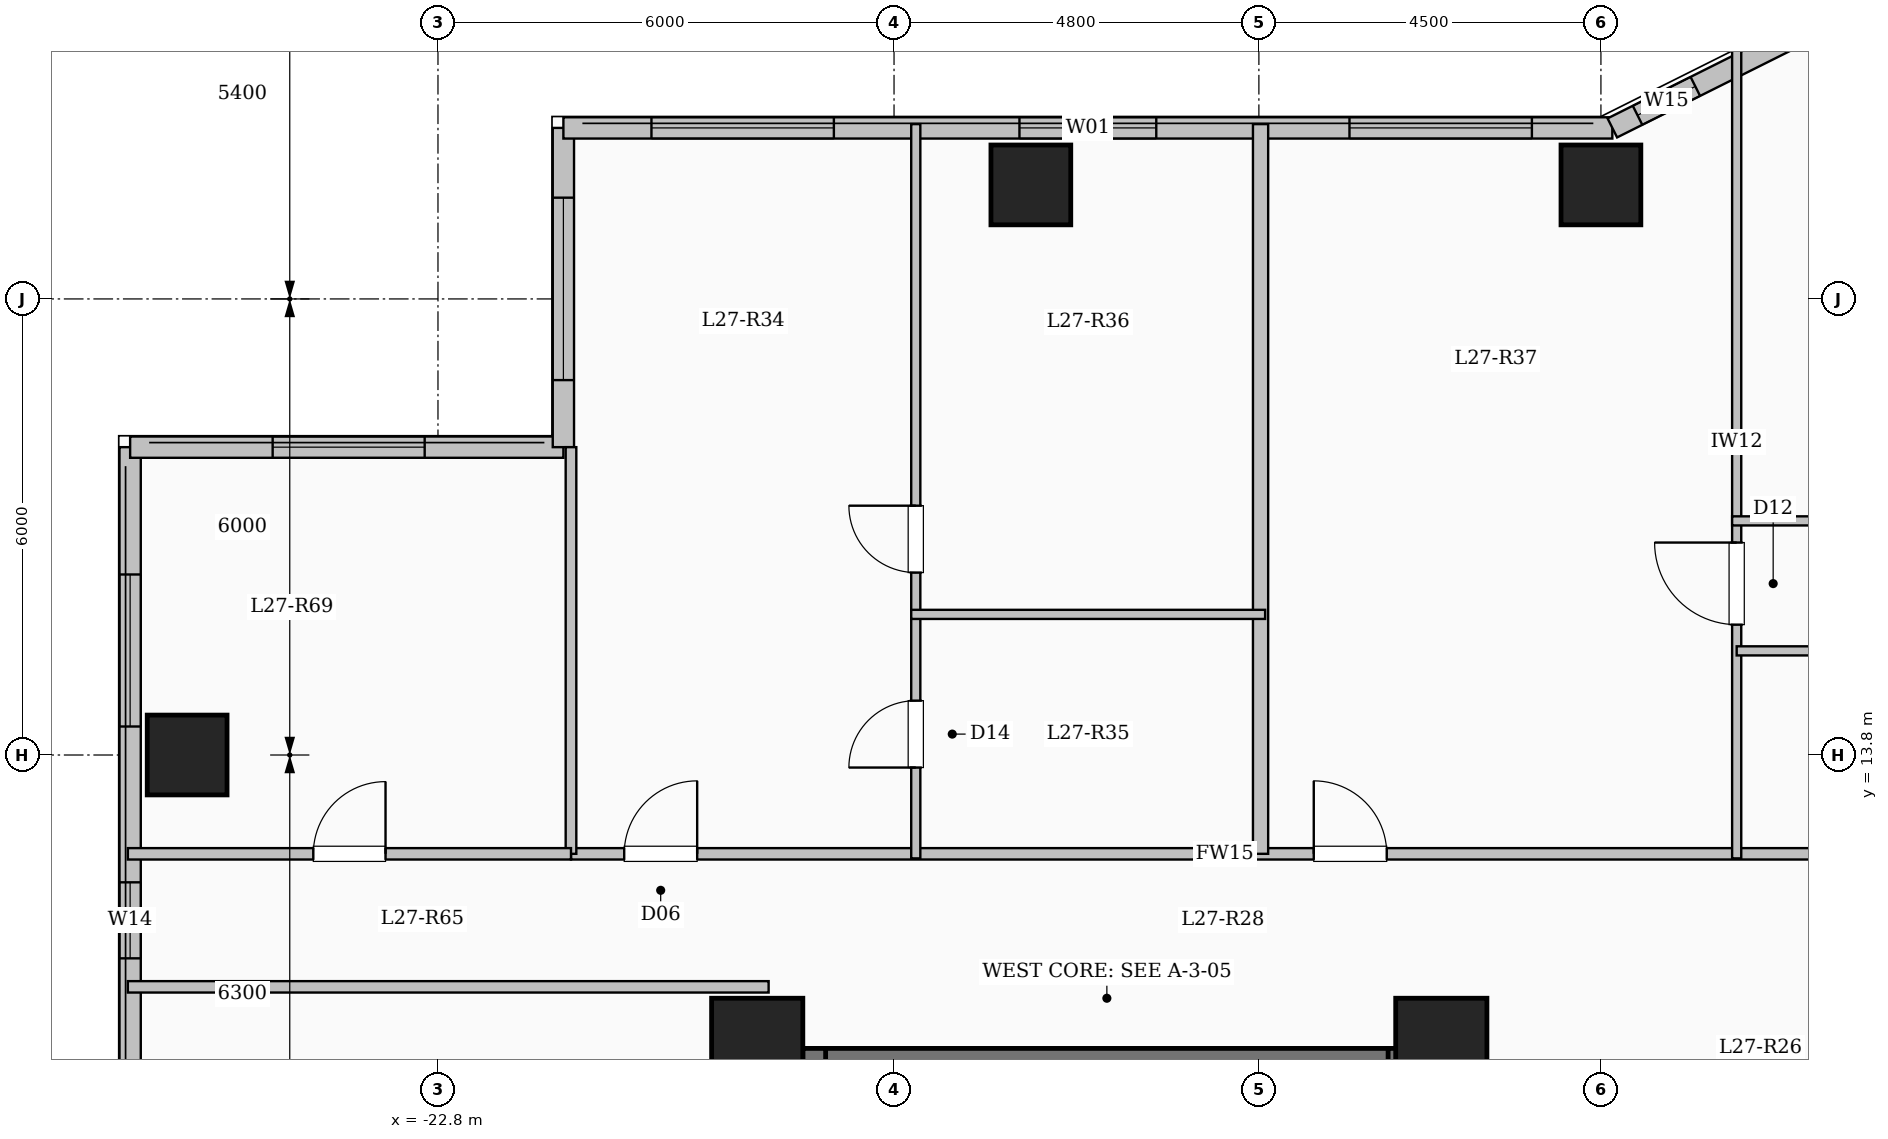
"""IFC4 building model, lengths in metres.
Left out: names, types, materials, properties, quantities, classifications, styles, units other than length and angle.
Written with IfcOpenShell. Run it as: python <this file> out.ifc"""

import sys

from ifc_helpers import new_model, si_unit, direction, frame, frame_2d, origin, origin_2d, place, context, subcontext, project, spatial, rectangle, extrude, element, fill, save


model = new_model("IFC4")
c1 = context("Model", 3, precision=1e-05, world=origin(), true_north=direction((0.0, 1.0)))
c2 = subcontext(c1, "Body", "Model", "MODEL_VIEW")
j1 = project(units=[si_unit("LENGTHUNIT", "METRE"), si_unit("PLANEANGLEUNIT", "RADIAN")], contexts=[c1])
p1 = place(None, origin())
s1 = spatial("IfcSite", under=j1, at=p1, CompositionType="ELEMENT")
p2 = place(p1, origin())
s2 = spatial("IfcBuilding", under=s1, at=p2, CompositionType="ELEMENT")
p3 = place(p2, frame((0.0, 0.0, 101.75)))
s3 = spatial("IfcBuildingStorey", under=s2, at=p3, CompositionType="ELEMENT", Elevation=101.75)
for number, where, z_axis, x_axis in (
    (1, (-9.6, 10.0, 0.0), (0.0, 0.0, 1.0), (1.0, 0.0, 0.0)),
    (2, (-18.6, 10.0, 0.0), (0.0, 0.0, 1.0), (1.0, 0.0, 0.0)),
):
    element("IfcColumn", number, at=place(p3, frame(where, z_axis=z_axis, x_axis=x_axis)), inside=s3, PredefinedType="COLUMN", context=c2, shape_type="SweptSolid", body=[
        extrude(rectangle(XDim=1.2, YDim=1.2, at=origin_2d()), origin(), (0.0, 0.0, 1.0), 3.35),
    ])
for number, where, z_axis, x_axis in (
    (3, (-15.0, 21.3, 0.0), (0.0, 0.0, 1.0), (1.0, 0.0, 0.0)),
    (4, (-7.5, 21.3, 0.0), (0.0, 0.0, 1.0), (1.0, 0.0, 0.0)),
    (5, (-26.1, 13.8, 0.0), (0.0, 0.0, 1.0), (1.0, 0.0, 0.0)),
):
    element("IfcColumn", number, at=place(p3, frame(where, z_axis=z_axis, x_axis=x_axis)), inside=s3, PredefinedType="COLUMN", context=c2, shape_type="SweptSolid", body=[
        extrude(rectangle(XDim=1.05, YDim=1.05, at=origin_2d()), origin(), (0.0, 0.0, 1.0), 3.35),
    ])
p4 = place(p3, frame((-26.85, -17.85, 0.0), z_axis=(0.0, 0.0, 1.0), x_axis=(0.0, 1.0, 0.0)))
e6 = element("IfcWall", 6, at=p4, inside=s3, PredefinedType="SOLIDWALL", context=c2, shape_type="SweptSolid", body=[
    extrude(rectangle(XDim=35.7, YDim=0.28, at=frame_2d((17.85, 0.0))), origin(), (0.0, 0.0, 1.0), 3.1),
])
p5 = place(p4, frame((2.55, 0.0, 0.9)))
e7 = element("IfcOpeningElement", 7, at=p5, cuts=e6, PredefinedType="OPENING", context=c2, shape_type="SweptSolid", body=[
    extrude(rectangle(XDim=2.4, YDim=1.8, at=frame_2d((1.2, 0.9))), frame((0.0, 0.15, 0.0), z_axis=(0.0, -1.0, 0.0), x_axis=(1.0, 0.0, 0.0)), (0.0, 0.0, 1.0), 0.3),
])
p6 = place(p4, frame((8.343, 0.0, 0.9)))
e8 = element("IfcOpeningElement", 8, at=p6, cuts=e6, PredefinedType="OPENING", context=c2, shape_type="SweptSolid", body=[
    extrude(rectangle(XDim=1.5, YDim=1.65, at=frame_2d((0.75, 0.825))), frame((0.0, 0.15, 0.0), z_axis=(0.0, -1.0, 0.0), x_axis=(1.0, 0.0, 0.0)), (0.0, 0.0, 1.0), 0.3),
])
p7 = place(p4, frame((18.6, 0.0, 0.9)))
e9 = element("IfcOpeningElement", 9, at=p7, cuts=e6, PredefinedType="OPENING", context=c2, shape_type="SweptSolid", body=[
    extrude(rectangle(XDim=2.0, YDim=1.7, at=frame_2d((1.0, 0.85))), frame((0.0, 0.15, 0.0), z_axis=(0.0, -1.0, 0.0), x_axis=(1.0, 0.0, 0.0)), (0.0, 0.0, 1.0), 0.3),
])
p8 = place(p4, frame((28.975, 0.0, 0.95)))
e10 = element("IfcOpeningElement", 10, at=p8, cuts=e6, PredefinedType="OPENING", context=c2, shape_type="SweptSolid", body=[
    extrude(rectangle(XDim=1.0, YDim=1.5, at=frame_2d((0.5, 0.75))), frame((0.0, 0.15, 0.0), z_axis=(0.0, -1.0, 0.0), x_axis=(1.0, 0.0, 0.0)), (0.0, 0.0, 1.0), 0.3),
])
p9 = place(p4, frame((32.025, 0.0, 0.9)))
e11 = element("IfcOpeningElement", 11, at=p9, cuts=e6, PredefinedType="OPENING", context=c2, shape_type="SweptSolid", body=[
    extrude(rectangle(XDim=2.0, YDim=1.7, at=frame_2d((1.0, 0.85))), frame((0.0, 0.15, 0.0), z_axis=(0.0, -1.0, 0.0), x_axis=(1.0, 0.0, 0.0)), (0.0, 0.0, 1.0), 0.3),
])
p10 = place(p3, frame((-26.85, 17.85, 0.0), z_axis=(0.0, 0.0, 1.0), x_axis=(1.0, 0.0, 0.0)))
e12 = element("IfcWall", 12, at=p10, inside=s3, PredefinedType="SOLIDWALL", context=c2, shape_type="SweptSolid", body=[
    extrude(rectangle(XDim=5.7, YDim=0.28, at=frame_2d((2.85, 0.0))), origin(), (0.0, 0.0, 1.0), 3.1),
])
p11 = place(p10, frame((1.875, 0.0, 0.9)))
e13 = element("IfcOpeningElement", 13, at=p11, cuts=e12, PredefinedType="OPENING", context=c2, shape_type="SweptSolid", body=[
    extrude(rectangle(XDim=2.0, YDim=1.7, at=frame_2d((1.0, 0.85))), frame((0.0, 0.15, 0.0), z_axis=(0.0, -1.0, 0.0), x_axis=(1.0, 0.0, 0.0)), (0.0, 0.0, 1.0), 0.3),
])
p12 = place(p3, frame((-21.15, 17.85, 0.0), z_axis=(0.0, 0.0, 1.0), x_axis=(0.0, 1.0, 0.0)))
e14 = element("IfcWall", 14, at=p12, inside=s3, PredefinedType="SOLIDWALL", context=c2, shape_type="SweptSolid", body=[
    extrude(rectangle(XDim=4.2, YDim=0.28, at=frame_2d((2.1, 0.0))), origin(), (0.0, 0.0, 1.0), 3.1),
])
p13 = place(p12, frame((0.882, 0.0, 0.9)))
e15 = element("IfcOpeningElement", 15, at=p13, cuts=e14, PredefinedType="OPENING", context=c2, shape_type="SweptSolid", body=[
    extrude(rectangle(XDim=2.4, YDim=1.8, at=frame_2d((1.2, 0.9))), frame((0.0, 0.15, 0.0), z_axis=(0.0, -1.0, 0.0), x_axis=(1.0, 0.0, 0.0)), (0.0, 0.0, 1.0), 0.3),
])
p14 = place(p3, frame((-21.15, 22.05, 0.0), z_axis=(0.0, 0.0, 1.0), x_axis=(1.0, 0.0, 0.0)))
e16 = element("IfcWall", 16, at=p14, inside=s3, PredefinedType="SOLIDWALL", context=c2, shape_type="SweptSolid", body=[
    extrude(rectangle(XDim=13.8, YDim=0.28, at=frame_2d((6.9, 0.0))), origin(), (0.0, 0.0, 1.0), 3.1),
])
p15 = place(p14, frame((1.158, 0.0, 0.9)))
e17 = element("IfcOpeningElement", 17, at=p15, cuts=e16, PredefinedType="OPENING", context=c2, shape_type="SweptSolid", body=[
    extrude(rectangle(XDim=2.4, YDim=1.8, at=frame_2d((1.2, 0.9))), frame((0.0, 0.15, 0.0), z_axis=(0.0, -1.0, 0.0), x_axis=(1.0, 0.0, 0.0)), (0.0, 0.0, 1.0), 0.3),
])
p16 = place(p14, frame((6.0, 0.0, 0.9)))
e18 = element("IfcOpeningElement", 18, at=p16, cuts=e16, PredefinedType="OPENING", context=c2, shape_type="SweptSolid", body=[
    extrude(rectangle(XDim=1.8, YDim=1.65, at=frame_2d((0.9, 0.825))), frame((0.0, 0.15, 0.0), z_axis=(0.0, -1.0, 0.0), x_axis=(1.0, 0.0, 0.0)), (0.0, 0.0, 1.0), 0.3),
])
p17 = place(p14, frame((10.342, 0.0, 0.9)))
e19 = element("IfcOpeningElement", 19, at=p17, cuts=e16, PredefinedType="OPENING", context=c2, shape_type="SweptSolid", body=[
    extrude(rectangle(XDim=2.4, YDim=1.8, at=frame_2d((1.2, 0.9))), frame((0.0, 0.15, 0.0), z_axis=(0.0, -1.0, 0.0), x_axis=(1.0, 0.0, 0.0)), (0.0, 0.0, 1.0), 0.3),
])
p18 = place(p3, frame((-7.35, 22.05, 0.0), z_axis=(0.0, 0.0, 1.0), x_axis=(0.894427191, 0.4472135955, 0.0)))
e20 = element("IfcWall", 20, at=p18, inside=s3, PredefinedType="SOLIDWALL", context=c2, shape_type="SweptSolid", body=[
    extrude(rectangle(XDim=3.354, YDim=0.28, at=frame_2d((1.677, 0.0))), origin(), (0.0, 0.0, 1.0), 3.1),
])
p19 = place(p18, frame((0.371, 0.0, 0.95)))
e21 = element("IfcOpeningElement", 21, at=p19, cuts=e20, PredefinedType="OPENING", context=c2, shape_type="SweptSolid", body=[
    extrude(rectangle(XDim=0.85, YDim=1.5, at=frame_2d((0.425, 0.75))), frame((0.0, 0.15, 0.0), z_axis=(0.0, -1.0, 0.0), x_axis=(1.0, 0.0, 0.0)), (0.0, 0.0, 1.0), 0.3),
])
p20 = place(p3, frame((-18.0, 9.79, 0.0), z_axis=(0.0, 0.0, 1.0), x_axis=(1.0, 0.0, 0.0)))
e22 = element("IfcWall", 22, at=p20, inside=s3, PredefinedType="SHEAR", context=c2, shape_type="SweptSolid", body=[
    extrude(rectangle(XDim=8.0, YDim=0.3, at=frame_2d((4.0, 0.0))), origin(), (0.0, 0.0, 1.0), 3.35),
])
for number, where, z_axis, x_axis in (
    (23, (-17.85, 6.35, 0.0), (0.0, 0.0, 1.0), (0.0, 1.0, 0.0)),
    (24, (-10.15, 6.35, 0.0), (0.0, 0.0, 1.0), (0.0, 1.0, 0.0)),
):
    element("IfcWall", number, at=place(p3, frame(where, z_axis=z_axis, x_axis=x_axis)), inside=s3, PredefinedType="SHEAR", context=c2, shape_type="SweptSolid", body=[
        extrude(rectangle(XDim=3.59, YDim=0.3, at=frame_2d((1.795, 0.0))), origin(), (0.0, 0.0, 1.0), 3.35),
    ])
p21 = place(p3, frame((-21.05, 12.5, 0.0), z_axis=(0.0, 0.0, 1.0), x_axis=(1.0, 0.0, 0.0)))
e25 = element("IfcWall", 25, at=p21, inside=s3, PredefinedType="PARTITIONING", context=c2, shape_type="SweptSolid", body=[
    extrude(rectangle(XDim=17.2, YDim=0.15, at=frame_2d((8.6, 0.0))), origin(), (0.0, 0.0, 1.0), 3.1),
])
p22 = place(p21, frame((0.7, 0.0, 0.0)))
e26 = element("IfcOpeningElement", 26, at=p22, cuts=e25, PredefinedType="OPENING", context=c2, shape_type="SweptSolid", body=[
    extrude(rectangle(XDim=0.96, YDim=2.15, at=frame_2d((0.48, 1.075))), frame((0.0, 0.085, 0.0), z_axis=(0.0, -1.0, 0.0), x_axis=(1.0, 0.0, 0.0)), (0.0, 0.0, 1.0), 0.17),
])
p23 = place(p21, frame((9.772, 0.0, 0.0)))
e27 = element("IfcOpeningElement", 27, at=p23, cuts=e25, PredefinedType="OPENING", context=c2, shape_type="SweptSolid", body=[
    extrude(rectangle(XDim=0.96, YDim=2.15, at=frame_2d((0.48, 1.075))), frame((0.0, 0.085, 0.0), z_axis=(0.0, -1.0, 0.0), x_axis=(1.0, 0.0, 0.0)), (0.0, 0.0, 1.0), 0.17),
])
p24 = place(p3, frame((-11.978, 12.5, 0.0), z_axis=(0.0, 0.0, 1.0), x_axis=(0.0, 1.0, 0.0)))
e28 = element("IfcWall", 28, at=p24, inside=s3, PredefinedType="SOLIDWALL", context=c2, shape_type="SweptSolid", body=[
    extrude(rectangle(XDim=9.6, YDim=0.2, at=frame_2d((4.8, 0.0))), origin(), (0.0, 0.0, 1.0), 3.1),
])
p25 = place(p3, frame((-16.514, 12.44, 0.0), z_axis=(0.0, 0.0, 1.0), x_axis=(0.0, 1.0, 0.0)))
e29 = element("IfcWall", 29, at=p25, inside=s3, PredefinedType="PARTITIONING", context=c2, shape_type="SweptSolid", body=[
    extrude(rectangle(XDim=3.21, YDim=0.12, at=frame_2d((1.605, 0.0))), origin(), (0.0, 0.0, 1.0), 3.1),
])
p26 = place(p25, frame((1.195, 0.0, 0.0)))
e30 = element("IfcOpeningElement", 30, at=p26, cuts=e29, PredefinedType="OPENING", context=c2, shape_type="SweptSolid", body=[
    extrude(rectangle(XDim=0.88, YDim=2.1, at=frame_2d((0.44, 1.05))), frame((0.0, 0.07, 0.0), z_axis=(0.0, -1.0, 0.0), x_axis=(1.0, 0.0, 0.0)), (0.0, 0.0, 1.0), 0.14),
])
p27 = place(p3, frame((-16.514, 15.65, 0.0), z_axis=(0.0, 0.0, 1.0), x_axis=(0.0, 1.0, 0.0)))
e31 = element("IfcWall", 31, at=p27, inside=s3, PredefinedType="PARTITIONING", context=c2, shape_type="SweptSolid", body=[
    extrude(rectangle(XDim=6.45, YDim=0.12, at=frame_2d((3.225, 0.0))), origin(), (0.0, 0.0, 1.0), 3.1),
])
p28 = place(p27, frame((0.55, 0.0, 0.0)))
e32 = element("IfcOpeningElement", 32, at=p28, cuts=e31, PredefinedType="OPENING", context=c2, shape_type="SweptSolid", body=[
    extrude(rectangle(XDim=0.88, YDim=2.1, at=frame_2d((0.44, 1.05))), frame((0.0, 0.07, 0.0), z_axis=(0.0, -1.0, 0.0), x_axis=(1.0, 0.0, 0.0)), (0.0, 0.0, 1.0), 0.14),
])
p29 = place(p3, frame((-16.574, 15.65, 0.0), z_axis=(0.0, 0.0, 1.0), x_axis=(1.0, 0.0, 0.0)))
e33 = element("IfcWall", 33, at=p29, inside=s3, PredefinedType="PARTITIONING", context=c2, shape_type="SweptSolid", body=[
    extrude(rectangle(XDim=4.656, YDim=0.12, at=frame_2d((2.328, 0.0))), origin(), (0.0, 0.0, 1.0), 3.1),
])
p30 = place(p3, frame((-5.714, 12.44, 0.0), z_axis=(0.0, 0.0, 1.0), x_axis=(0.0, 1.0, 0.0)))
e34 = element("IfcWall", 34, at=p30, inside=s3, PredefinedType="PARTITIONING", context=c2, shape_type="SweptSolid", body=[
    extrude(rectangle(XDim=10.964, YDim=0.12, at=frame_2d((5.482, 0.0))), origin(), (0.0, 0.0, 1.0), 3.1),
])
p31 = place(p30, frame((3.075, 0.0, 0.0)))
e35 = element("IfcOpeningElement", 35, at=p31, cuts=e34, PredefinedType="OPENING", context=c2, shape_type="SweptSolid", body=[
    extrude(rectangle(XDim=1.08, YDim=2.15, at=frame_2d((0.54, 1.075))), frame((0.0, 0.07, 0.0), z_axis=(0.0, -1.0, 0.0), x_axis=(1.0, 0.0, 0.0)), (0.0, 0.0, 1.0), 0.14),
])
p32 = place(p3, frame((-5.714, 15.17, 0.0), z_axis=(0.0, 0.0, 1.0), x_axis=(1.0, 0.0, 0.0)))
e36 = element("IfcWall", 36, at=p32, inside=s3, PredefinedType="PARTITIONING", context=c2, shape_type="SweptSolid", body=[
    extrude(rectangle(XDim=3.536, YDim=0.12, at=frame_2d((1.768, 0.0))), origin(), (0.0, 0.0, 1.0), 3.1),
])
p33 = place(p32, frame((1.328, 0.0, 0.0)))
e37 = element("IfcOpeningElement", 37, at=p33, cuts=e36, PredefinedType="OPENING", context=c2, shape_type="SweptSolid", body=[
    extrude(rectangle(XDim=0.88, YDim=2.1, at=frame_2d((0.44, 1.05))), frame((0.0, 0.07, 0.0), z_axis=(0.0, -1.0, 0.0), x_axis=(1.0, 0.0, 0.0)), (0.0, 0.0, 1.0), 0.14),
])
p34 = place(p3, frame((-5.774, 16.88, 0.0), z_axis=(0.0, 0.0, 1.0), x_axis=(1.0, 0.0, 0.0)))
e38 = element("IfcWall", 38, at=p34, inside=s3, PredefinedType="PARTITIONING", context=c2, shape_type="SweptSolid", body=[
    extrude(rectangle(XDim=6.384, YDim=0.12, at=frame_2d((3.192, 0.0))), origin(), (0.0, 0.0, 1.0), 3.1),
])
p35 = place(p34, frame((2.662, 0.0, 0.0)))
e39 = element("IfcOpeningElement", 39, at=p35, cuts=e38, PredefinedType="OPENING", context=c2, shape_type="SweptSolid", body=[
    extrude(rectangle(XDim=0.88, YDim=2.1, at=frame_2d((0.44, 1.05))), frame((0.0, 0.07, 0.0), z_axis=(0.0, -1.0, 0.0), x_axis=(1.0, 0.0, 0.0)), (0.0, 0.0, 1.0), 0.14),
])
p36 = place(p3, frame((-26.88, 10.75, 0.0), z_axis=(0.0, 0.0, 1.0), x_axis=(1.0, 0.0, 0.0)))
e40 = element("IfcWall", 40, at=p36, inside=s3, PredefinedType="PARTITIONING", context=c2, shape_type="SweptSolid", body=[
    extrude(rectangle(XDim=8.43, YDim=0.15, at=frame_2d((4.215, 0.0))), origin(), (0.0, 0.0, 1.0), 3.1),
])
p37 = place(p3, frame((-21.05, 12.5, 0.0), z_axis=(0.0, 0.0, 1.0), x_axis=(0.0, 1.0, 0.0)))
e41 = element("IfcWall", 41, at=p37, inside=s3, PredefinedType="PARTITIONING", context=c2, shape_type="SweptSolid", body=[
    extrude(rectangle(XDim=5.35, YDim=0.14, at=frame_2d((2.675, 0.0))), origin(), (0.0, 0.0, 1.0), 3.1),
])
p38 = place(p3, frame((-26.88, 12.5, 0.0), z_axis=(0.0, 0.0, 1.0), x_axis=(1.0, 0.0, 0.0)))
e42 = element("IfcWall", 42, at=p38, inside=s3, PredefinedType="PARTITIONING", context=c2, shape_type="SweptSolid", body=[
    extrude(rectangle(XDim=5.83, YDim=0.15, at=frame_2d((2.915, 0.0))), origin(), (0.0, 0.0, 1.0), 3.1),
])
p39 = place(p38, frame((2.44, 0.0, 0.0)))
e43 = element("IfcOpeningElement", 43, at=p39, cuts=e42, PredefinedType="OPENING", context=c2, shape_type="SweptSolid", body=[
    extrude(rectangle(XDim=0.95, YDim=2.15, at=frame_2d((0.475, 1.075))), frame((0.0, 0.085, 0.0), z_axis=(0.0, -1.0, 0.0), x_axis=(1.0, 0.0, 0.0)), (0.0, 0.0, 1.0), 0.17),
])
p40 = place(p8, origin())
e44 = element("IfcWindow", 44, at=p40, inside=s3, PartitioningType="SINGLE_PANEL", PredefinedType="WINDOW", context=c2, shape_type="SweptSolid", body=[
    extrude(rectangle(XDim=1.0, YDim=1.5, at=frame_2d((0.5, 0.75))), frame((0.0, 0.03, 0.0), z_axis=(0.0, -1.0, 0.0), x_axis=(1.0, 0.0, 0.0)), (0.0, 0.0, 1.0), 0.06),
])
fill(e10, e44)
p41 = place(p9, origin())
e45 = element("IfcWindow", 45, at=p41, inside=s3, PartitioningType="SINGLE_PANEL", PredefinedType="WINDOW", context=c2, shape_type="SweptSolid", body=[
    extrude(rectangle(XDim=2.0, YDim=1.7, at=frame_2d((1.0, 0.85))), frame((0.0, 0.03, 0.0), z_axis=(0.0, -1.0, 0.0), x_axis=(1.0, 0.0, 0.0)), (0.0, 0.0, 1.0), 0.06),
])
fill(e11, e45)
p42 = place(p11, origin())
e46 = element("IfcWindow", 46, at=p42, inside=s3, PartitioningType="SINGLE_PANEL", PredefinedType="WINDOW", context=c2, shape_type="SweptSolid", body=[
    extrude(rectangle(XDim=2.0, YDim=1.7, at=frame_2d((1.0, 0.85))), frame((0.0, 0.03, 0.0), z_axis=(0.0, -1.0, 0.0), x_axis=(1.0, 0.0, 0.0)), (0.0, 0.0, 1.0), 0.06),
])
fill(e13, e46)
p43 = place(p13, origin())
e47 = element("IfcWindow", 47, at=p43, inside=s3, PartitioningType="SINGLE_PANEL", PredefinedType="WINDOW", context=c2, shape_type="SweptSolid", body=[
    extrude(rectangle(XDim=2.4, YDim=1.8, at=frame_2d((1.2, 0.9))), frame((0.0, 0.03, 0.0), z_axis=(0.0, -1.0, 0.0), x_axis=(1.0, 0.0, 0.0)), (0.0, 0.0, 1.0), 0.06),
])
fill(e15, e47)
p44 = place(p15, origin())
e48 = element("IfcWindow", 48, at=p44, inside=s3, PartitioningType="SINGLE_PANEL", PredefinedType="WINDOW", context=c2, shape_type="SweptSolid", body=[
    extrude(rectangle(XDim=2.4, YDim=1.8, at=frame_2d((1.2, 0.9))), frame((0.0, 0.03, 0.0), z_axis=(0.0, -1.0, 0.0), x_axis=(1.0, 0.0, 0.0)), (0.0, 0.0, 1.0), 0.06),
])
fill(e17, e48)
p45 = place(p16, origin())
e49 = element("IfcWindow", 49, at=p45, inside=s3, PartitioningType="SINGLE_PANEL", PredefinedType="WINDOW", context=c2, shape_type="SweptSolid", body=[
    extrude(rectangle(XDim=1.8, YDim=1.65, at=frame_2d((0.9, 0.825))), frame((0.0, 0.03, 0.0), z_axis=(0.0, -1.0, 0.0), x_axis=(1.0, 0.0, 0.0)), (0.0, 0.0, 1.0), 0.06),
])
fill(e18, e49)
p46 = place(p17, origin())
e50 = element("IfcWindow", 50, at=p46, inside=s3, PartitioningType="SINGLE_PANEL", PredefinedType="WINDOW", context=c2, shape_type="SweptSolid", body=[
    extrude(rectangle(XDim=2.4, YDim=1.8, at=frame_2d((1.2, 0.9))), frame((0.0, 0.03, 0.0), z_axis=(0.0, -1.0, 0.0), x_axis=(1.0, 0.0, 0.0)), (0.0, 0.0, 1.0), 0.06),
])
fill(e19, e50)
p47 = place(p19, origin())
e51 = element("IfcWindow", 51, at=p47, inside=s3, PartitioningType="SINGLE_PANEL", PredefinedType="WINDOW", context=c2, shape_type="SweptSolid", body=[
    extrude(rectangle(XDim=0.85, YDim=1.5, at=frame_2d((0.425, 0.75))), frame((0.0, 0.03, 0.0), z_axis=(0.0, -1.0, 0.0), x_axis=(1.0, 0.0, 0.0)), (0.0, 0.0, 1.0), 0.06),
])
fill(e21, e51)
p48 = place(p22, origin())
e52 = element("IfcDoor", 52, at=p48, inside=s3, OperationType="SINGLE_SWING_RIGHT", PredefinedType="DOOR", context=c2, shape_type="SweptSolid", body=[
    extrude(rectangle(XDim=0.96, YDim=2.15, at=frame_2d((0.48, 1.075))), frame((0.0, 0.025, 0.0), z_axis=(0.0, -1.0, 0.0), x_axis=(1.0, 0.0, 0.0)), (0.0, 0.0, 1.0), 0.05),
])
fill(e26, e52)
p49 = place(p26, origin())
e53 = element("IfcDoor", 53, at=p49, inside=s3, OperationType="SINGLE_SWING_LEFT", PredefinedType="DOOR", context=c2, shape_type="SweptSolid", body=[
    extrude(rectangle(XDim=0.88, YDim=2.1, at=frame_2d((0.44, 1.05))), frame((0.0, 0.025, 0.0), z_axis=(0.0, -1.0, 0.0), x_axis=(1.0, 0.0, 0.0)), (0.0, 0.0, 1.0), 0.05),
])
fill(e30, e53)
p50 = place(p28, origin())
e54 = element("IfcDoor", 54, at=p50, inside=s3, OperationType="SINGLE_SWING_RIGHT", PredefinedType="DOOR", context=c2, shape_type="SweptSolid", body=[
    extrude(rectangle(XDim=0.88, YDim=2.1, at=frame_2d((0.44, 1.05))), frame((0.0, 0.025, 0.0), z_axis=(0.0, -1.0, 0.0), x_axis=(1.0, 0.0, 0.0)), (0.0, 0.0, 1.0), 0.05),
])
fill(e32, e54)
p51 = place(p23, origin())
e55 = element("IfcDoor", 55, at=p51, inside=s3, OperationType="SINGLE_SWING_LEFT", PredefinedType="DOOR", context=c2, shape_type="SweptSolid", body=[
    extrude(rectangle(XDim=0.96, YDim=2.15, at=frame_2d((0.48, 1.075))), frame((0.0, 0.025, 0.0), z_axis=(0.0, -1.0, 0.0), x_axis=(1.0, 0.0, 0.0)), (0.0, 0.0, 1.0), 0.05),
])
fill(e27, e55)
p52 = place(p31, origin())
e56 = element("IfcDoor", 56, at=p52, inside=s3, OperationType="SINGLE_SWING_RIGHT", PredefinedType="DOOR", context=c2, shape_type="SweptSolid", body=[
    extrude(rectangle(XDim=1.08, YDim=2.15, at=frame_2d((0.54, 1.075))), frame((0.0, 0.025, 0.0), z_axis=(0.0, -1.0, 0.0), x_axis=(1.0, 0.0, 0.0)), (0.0, 0.0, 1.0), 0.05),
])
fill(e35, e56)
p53 = place(p39, origin())
e57 = element("IfcDoor", 57, at=p53, inside=s3, OperationType="SINGLE_SWING_RIGHT", PredefinedType="DOOR", context=c2, shape_type="SweptSolid", body=[
    extrude(rectangle(XDim=0.95, YDim=2.15, at=frame_2d((0.475, 1.075))), frame((0.0, 0.025, 0.0), z_axis=(0.0, -1.0, 0.0), x_axis=(1.0, 0.0, 0.0)), (0.0, 0.0, 1.0), 0.05),
])
fill(e43, e57)
save(model, sys.argv[1])
